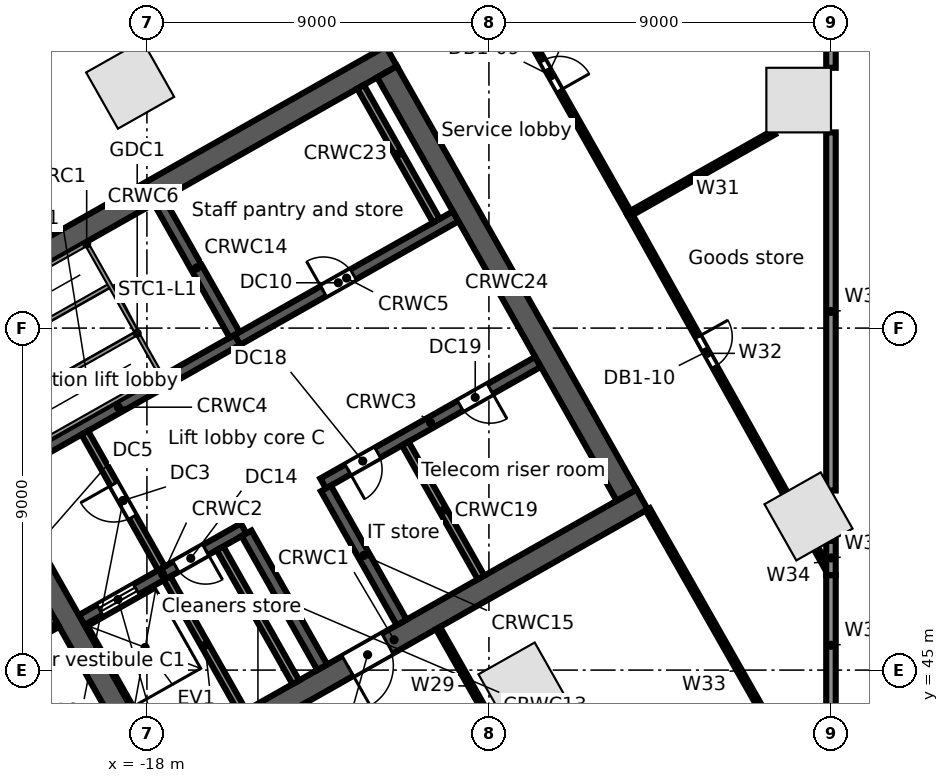
"""IFC4 building model, lengths in metres.
Left out: names, types, materials, properties, quantities, classifications, styles, units other than length and angle.
Written with IfcOpenShell. Run it as: python <this file> out.ifc"""

import sys

from ifc_helpers import new_model, si_unit, direction, frame, frame_2d, origin, origin_2d, place, context, subcontext, project, spatial, rectangle, extrude, element, fill, save


model = new_model("IFC4")
c1 = context("Model", 3, precision=1e-05, world=origin(), true_north=direction((0.0, 1.0)))
c2 = subcontext(c1, "Body", "Model", "MODEL_VIEW")
j1 = project(units=[si_unit("LENGTHUNIT", "METRE"), si_unit("PLANEANGLEUNIT", "RADIAN")], contexts=[c1])
p1 = place(None, origin())
s1 = spatial("IfcSite", under=j1, at=p1, CompositionType="ELEMENT")
p2 = place(p1, origin())
s2 = spatial("IfcBuilding", under=s1, at=p2, CompositionType="ELEMENT")
p3 = place(p2, frame((0.0, 0.0, -4.8)))
s3 = spatial("IfcBuildingStorey", under=s2, at=p3, CompositionType="ELEMENT", Elevation=-4.8)
p4 = place(p3, frame((-5.971, 78.503, 0.0), z_axis=(0.0, 0.0, 1.0), x_axis=(-0.870356741611, -0.492421711882, 0.0)))
e1 = element("IfcWall", 1, at=p4, inside=s3, PredefinedType="SOLIDWALL", context=c2, shape_type="SweptSolid", body=[
    extrude(rectangle(XDim=70.604, YDim=0.8, at=frame_2d((35.302, 0.0))), origin(), (0.0, 0.0, 1.0), 4.8),
])
for number, where, z_axis, x_axis in (
    (2, (-18.441, 60.406, 0.0), (0.0, 0.0, 1.0), (-0.87, -0.492, 0.0)),
    (3, (-8.117, 44.568, 0.0), (0.0, 0.0, 1.0), (0.87, 0.492, 0.0)),
    (4, (-0.591, 49.044, 0.0), (0.0, 0.0, 1.0), (0.87, 0.492, 0.0)),
    (5, (-0.85, 60.0, 0.0), (0.0, 0.0, 1.0), (0.0, 1.0, 0.0)),
):
    element("IfcColumn", number, at=place(p3, frame(where, z_axis=z_axis, x_axis=x_axis)), inside=s3, PredefinedType="COLUMN", context=c2, shape_type="SweptSolid", body=[
        extrude(rectangle(XDim=1.7, YDim=1.7, at=origin_2d()), origin(), (0.0, 0.0, 1.0), 4.8),
    ])
p5 = place(p3, frame((-18.024, 42.104, 0.0), z_axis=(0.0, 0.0, 1.0), x_axis=(0.870360574057, 0.492414937962, 0.0)))
e6 = element("IfcWall", 6, at=p5, inside=s3, PredefinedType="SOLIDWALL", context=c2, shape_type="SweptSolid", body=[
    extrude(rectangle(XDim=15.0, YDim=0.6, at=frame_2d((7.5, 0.0))), origin(), (0.0, 0.0, 1.0), 4.35),
])
p6 = place(p5, frame((6.1, 0.0, 0.0)))
e7 = element("IfcOpeningElement", 7, at=p6, cuts=e6, PredefinedType="OPENING", context=c2, shape_type="SweptSolid", body=[
    extrude(rectangle(XDim=1.2, YDim=2.1, at=frame_2d((0.6, 1.05))), frame((0.0, 0.31, 0.0), z_axis=(0.0, -1.0, 0.0), x_axis=(1.0, 0.0, 0.0)), (0.0, 0.0, 1.0), 0.62),
])
p7 = place(p3, frame((-19.718, 46.316, 0.0), z_axis=(0.0, 0.0, 1.0), x_axis=(0.870353963862, 0.492426621528, 0.0)))
e8 = element("IfcWall", 8, at=p7, inside=s3, PredefinedType="SOLIDWALL", context=c2, shape_type="SweptSolid", body=[
    extrude(rectangle(XDim=4.9, YDim=0.3, at=frame_2d((2.45, 0.0))), origin(), (0.0, 0.0, 1.0), 4.35),
])
p8 = place(p7, frame((0.55, 0.0, 0.0)))
e9 = element("IfcOpeningElement", 9, at=p8, cuts=e8, PredefinedType="OPENING", context=c2, shape_type="SweptSolid", body=[
    extrude(rectangle(XDim=1.1, YDim=2.1, at=frame_2d((0.55, 1.05))), frame((0.0, 0.16, 0.0), z_axis=(0.0, -1.0, 0.0), x_axis=(1.0, 0.0, 0.0)), (0.0, 0.0, 1.0), 0.32),
])
p9 = place(p7, frame((2.85, 0.0, 0.0)))
e10 = element("IfcOpeningElement", 10, at=p9, cuts=e8, PredefinedType="OPENING", context=c2, shape_type="SweptSolid", body=[
    extrude(rectangle(XDim=0.9, YDim=2.1, at=frame_2d((0.45, 1.05))), frame((0.0, 0.16, 0.0), z_axis=(0.0, -1.0, 0.0), x_axis=(1.0, 0.0, 0.0)), (0.0, 0.0, 1.0), 0.32),
])
p10 = place(p3, frame((-13.365, 49.911, 0.0), z_axis=(0.0, 0.0, 1.0), x_axis=(0.870340995471, 0.49244954219, 0.0)))
e11 = element("IfcWall", 11, at=p10, inside=s3, PredefinedType="SOLIDWALL", context=c2, shape_type="SweptSolid", body=[
    extrude(rectangle(XDim=6.5, YDim=0.3, at=frame_2d((3.25, 0.0))), origin(), (0.0, 0.0, 1.0), 4.35),
])
p11 = place(p10, frame((0.75, 0.0, 0.0)))
e12 = element("IfcOpeningElement", 12, at=p11, cuts=e11, PredefinedType="OPENING", context=c2, shape_type="SweptSolid", body=[
    extrude(rectangle(XDim=0.9, YDim=2.1, at=frame_2d((0.45, 1.05))), frame((0.0, 0.16, 0.0), z_axis=(0.0, -1.0, 0.0), x_axis=(1.0, 0.0, 0.0)), (0.0, 0.0, 1.0), 0.32),
])
p12 = place(p10, frame((4.15, 0.0, 0.0)))
e13 = element("IfcOpeningElement", 13, at=p12, cuts=e11, PredefinedType="OPENING", context=c2, shape_type="SweptSolid", body=[
    extrude(rectangle(XDim=0.9, YDim=2.1, at=frame_2d((0.45, 1.05))), frame((0.0, 0.16, 0.0), z_axis=(0.0, -1.0, 0.0), x_axis=(1.0, 0.0, 0.0)), (0.0, 0.0, 1.0), 0.32),
])
p13 = place(p3, frame((-21.885, 50.146, 0.0), z_axis=(0.0, 0.0, 1.0), x_axis=(0.870359411463, 0.492416992881, 0.0)))
e14 = element("IfcWall", 14, at=p13, inside=s3, PredefinedType="SOLIDWALL", context=c2, shape_type="SweptSolid", body=[
    extrude(rectangle(XDim=7.2, YDim=0.3, at=frame_2d((3.6, 0.0))), origin(), (0.0, 0.0, 1.0), 4.35),
])
p14 = place(p13, frame((0.2, 0.0, 0.0)))
e15 = element("IfcOpeningElement", 15, at=p14, cuts=e14, PredefinedType="OPENING", context=c2, shape_type="SweptSolid", body=[
    extrude(rectangle(XDim=1.0, YDim=2.1, at=frame_2d((0.5, 1.05))), frame((0.0, 0.16, 0.0), z_axis=(0.0, -1.0, 0.0), x_axis=(1.0, 0.0, 0.0)), (0.0, 0.0, 1.0), 0.32),
])
p15 = place(p3, frame((-15.618, 53.691, 0.0), z_axis=(0.0, 0.0, 1.0), x_axis=(0.870356769198, 0.492421663121, 0.0)))
e16 = element("IfcWall", 16, at=p15, inside=s3, PredefinedType="SOLIDWALL", context=c2, shape_type="SweptSolid", body=[
    extrude(rectangle(XDim=6.6, YDim=0.3, at=frame_2d((3.3, 0.0))), origin(), (0.0, 0.0, 1.0), 4.35),
])
p16 = place(p15, frame((2.6, 0.0, 0.0)))
e17 = element("IfcOpeningElement", 17, at=p16, cuts=e16, PredefinedType="OPENING", context=c2, shape_type="SweptSolid", body=[
    extrude(rectangle(XDim=0.9, YDim=2.1, at=frame_2d((0.45, 1.05))), frame((0.0, 0.16, 0.0), z_axis=(0.0, -1.0, 0.0), x_axis=(1.0, 0.0, 0.0)), (0.0, 0.0, 1.0), 0.32),
])
p17 = place(p3, frame((-24.623, 53.767, 0.0), z_axis=(0.0, 0.0, 1.0), x_axis=(0.870356627484, 0.492421913601, 0.0)))
e18 = element("IfcWall", 18, at=p17, inside=s3, PredefinedType="SOLIDWALL", context=c2, shape_type="SweptSolid", body=[
    extrude(rectangle(XDim=15.0, YDim=0.6, at=frame_2d((7.5, 0.0))), origin(), (0.0, 0.0, 1.0), 4.35),
])
p18 = place(p3, frame((-24.214, 53.654, 0.0), z_axis=(0.0, 0.0, 1.0), x_axis=(0.492441221355, -0.870345703448, 0.0)))
e19 = element("IfcWall", 19, at=p18, inside=s3, PredefinedType="SOLIDWALL", context=c2, shape_type="SweptSolid", body=[
    extrude(rectangle(XDim=12.8, YDim=0.6, at=frame_2d((6.4, 0.0))), origin(), (0.0, 0.0, 1.0), 4.35),
])
p19 = place(p18, frame((5.8, 0.0, 0.0)))
e20 = element("IfcOpeningElement", 20, at=p19, cuts=e19, PredefinedType="OPENING", context=c2, shape_type="SweptSolid", body=[
    extrude(rectangle(XDim=1.2, YDim=2.1, at=frame_2d((0.6, 1.05))), frame((0.0, 0.31, 0.0), z_axis=(0.0, -1.0, 0.0), x_axis=(1.0, 0.0, 0.0)), (0.0, 0.0, 1.0), 0.62),
])
p20 = place(p3, frame((-17.469, 47.417, 0.0), z_axis=(0.0, 0.0, 1.0), x_axis=(0.492440575896, -0.870346068648, 0.0)))
e21 = element("IfcWall", 21, at=p20, inside=s3, PredefinedType="SOLIDWALL", context=c2, shape_type="SweptSolid", body=[
    extrude(rectangle(XDim=4.05, YDim=0.2, at=frame_2d((2.025, 0.0))), origin(), (0.0, 0.0, 1.0), 4.35),
])
p21 = place(p3, frame((-19.635, 51.246, 0.0), z_axis=(0.0, 0.0, 1.0), x_axis=(0.492408451753, -0.87036424366, 0.0)))
e22 = element("IfcWall", 22, at=p21, inside=s3, PredefinedType="PARTITIONING", context=c2, shape_type="SweptSolid", body=[
    extrude(rectangle(XDim=4.1, YDim=0.2, at=frame_2d((2.05, 0.0))), origin(), (0.0, 0.0, 1.0), 4.35),
])
p22 = place(p21, frame((1.55, 0.0, 0.0)))
e23 = element("IfcOpeningElement", 23, at=p22, cuts=e22, PredefinedType="OPENING", context=c2, shape_type="SweptSolid", body=[
    extrude(rectangle(XDim=1.0, YDim=2.1, at=frame_2d((0.5, 1.05))), frame((0.0, 0.11, 0.0), z_axis=(0.0, -1.0, 0.0), x_axis=(1.0, 0.0, 0.0)), (0.0, 0.0, 1.0), 0.22),
])
p23 = place(p3, frame((-16.076, 48.205, 0.0), z_axis=(0.0, 0.0, 1.0), x_axis=(0.492394910396, -0.870371904542, 0.0)))
e24 = element("IfcWall", 24, at=p23, inside=s3, PredefinedType="SOLIDWALL", context=c2, shape_type="SweptSolid", body=[
    extrude(rectangle(XDim=4.05, YDim=0.2, at=frame_2d((2.025, 0.0))), origin(), (0.0, 0.0, 1.0), 4.35),
])
p24 = place(p3, frame((-15.379, 48.599, 0.0), z_axis=(0.0, 0.0, 1.0), x_axis=(0.492394910396, -0.870371904542, 0.0)))
e25 = element("IfcWall", 25, at=p24, inside=s3, PredefinedType="SOLIDWALL", context=c2, shape_type="SweptSolid", body=[
    extrude(rectangle(XDim=4.05, YDim=0.3, at=frame_2d((2.025, 0.0))), origin(), (0.0, 0.0, 1.0), 4.35),
])
p25 = place(p3, frame((-17.686, 57.347, 0.0), z_axis=(0.0, 0.0, 1.0), x_axis=(0.492420746998, -0.870357287513, 0.0)))
e26 = element("IfcWall", 26, at=p25, inside=s3, PredefinedType="SOLIDWALL", context=c2, shape_type="SweptSolid", body=[
    extrude(rectangle(XDim=4.05, YDim=0.3, at=frame_2d((2.025, 0.0))), origin(), (0.0, 0.0, 1.0), 4.35),
])
p26 = place(p3, frame((-13.291, 49.781, 0.0), z_axis=(0.0, 0.0, 1.0), x_axis=(0.492394910396, -0.870371904542, 0.0)))
e27 = element("IfcWall", 27, at=p26, inside=s3, PredefinedType="SOLIDWALL", context=c2, shape_type="SweptSolid", body=[
    extrude(rectangle(XDim=4.05, YDim=0.3, at=frame_2d((2.025, 0.0))), origin(), (0.0, 0.0, 1.0), 4.35),
])
p27 = place(p3, frame((-11.202, 50.962, 0.0), z_axis=(0.0, 0.0, 1.0), x_axis=(0.49241474071, -0.870360685654, 0.0)))
e28 = element("IfcWall", 28, at=p27, inside=s3, PredefinedType="PARTITIONING", context=c2, shape_type="SweptSolid", body=[
    extrude(rectangle(XDim=4.05, YDim=0.2, at=frame_2d((2.025, 0.0))), origin(), (0.0, 0.0, 1.0), 4.35),
])
p28 = place(p3, frame((-12.377, 60.351, 0.0), z_axis=(0.0, 0.0, 1.0), x_axis=(0.492440575896, -0.870346068648, 0.0)))
e29 = element("IfcWall", 29, at=p28, inside=s3, PredefinedType="SOLIDWALL", context=c2, shape_type="SweptSolid", body=[
    extrude(rectangle(XDim=4.05, YDim=0.2, at=frame_2d((2.025, 0.0))), origin(), (0.0, 0.0, 1.0), 4.35),
])
p29 = place(p3, frame((-11.681, 60.744, 0.0), z_axis=(0.0, 0.0, 1.0), x_axis=(0.492426772896, -0.870353878221, 0.0)))
e30 = element("IfcWall", 30, at=p29, inside=s3, PredefinedType="SOLIDWALL", context=c2, shape_type="SweptSolid", body=[
    extrude(rectangle(XDim=12.8, YDim=0.6, at=frame_2d((6.4, 0.0))), origin(), (0.0, 0.0, 1.0), 4.35),
])
p30 = place(p3, frame((-23.464, 44.427, 0.0), z_axis=(0.0, 0.0, 1.0), x_axis=(0.870352535776, 0.492429145632, 0.0)))
e31 = element("IfcWall", 31, at=p30, inside=s3, PredefinedType="PARTITIONING", context=c2, shape_type="SweptSolid", body=[
    extrude(rectangle(XDim=3.591, YDim=0.125, at=frame_2d((1.795, 0.0))), origin(), (0.0, 0.0, 1.0), 4.35),
])
p31 = place(p3, frame((-13.822, 44.137, 0.0), z_axis=(0.0, 0.0, 1.0), x_axis=(0.492604200384, -0.870253469837, 0.0)))
e32 = element("IfcWall", 32, at=p31, inside=s3, PredefinedType="PARTITIONING", context=c2, shape_type="SweptSolid", body=[
    extrude(rectangle(XDim=3.5, YDim=0.125, at=frame_2d((1.75, 0.0))), origin(), (0.0, 0.0, 1.0), 3.63),
])
p32 = place(p3, frame((-10.34, 46.107, 0.0), z_axis=(0.0, 0.0, 1.0), x_axis=(0.492392845909, -0.87037307248, 0.0)))
e33 = element("IfcWall", 33, at=p32, inside=s3, PredefinedType="PARTITIONING", context=c2, shape_type="SweptSolid", body=[
    extrude(rectangle(XDim=3.5, YDim=0.125, at=frame_2d((1.75, 0.0))), origin(), (0.0, 0.0, 1.0), 3.63),
])
p33 = place(p3, frame((-9.532, 64.47, 0.0), z_axis=(0.0, 0.0, 1.0), x_axis=(0.492882680299, -0.870095778326, 0.0)))
e34 = element("IfcWall", 34, at=p33, inside=s3, PredefinedType="PARTITIONING", context=c2, shape_type="SweptSolid", body=[
    extrude(rectangle(XDim=8.584, YDim=0.125, at=frame_2d((4.292, 0.0))), origin(), (0.0, 0.0, 1.0), 3.412),
])
p34 = place(p33, frame((3.95, 0.0, 0.0)))
e35 = element("IfcOpeningElement", 35, at=p34, cuts=e34, PredefinedType="OPENING", context=c2, shape_type="SweptSolid", body=[
    extrude(rectangle(XDim=0.9, YDim=2.1, at=frame_2d((0.45, 1.05))), frame((0.0, 0.073, 0.0), z_axis=(0.0, -1.0, 0.0), x_axis=(1.0, 0.0, 0.0)), (0.0, 0.0, 1.0), 0.145),
])
p35 = place(p3, frame((-5.301, 57.001, 0.0), z_axis=(0.0, 0.0, 1.0), x_axis=(0.870403402545, 0.492339229433, 0.0)))
e36 = element("IfcWall", 36, at=p35, inside=s3, PredefinedType="PARTITIONING", context=c2, shape_type="SweptSolid", body=[
    extrude(rectangle(XDim=4.365, YDim=0.125, at=frame_2d((2.182, 0.0))), origin(), (0.0, 0.0, 1.0), 3.412),
])
p36 = place(p3, frame((-5.301, 57.001, 0.0), z_axis=(0.0, 0.0, 1.0), x_axis=(0.487215056149, -0.873282021492, 0.0)))
e37 = element("IfcWall", 37, at=p36, inside=s3, PredefinedType="PARTITIONING", context=c2, shape_type="SweptSolid", body=[
    extrude(rectangle(XDim=8.395, YDim=0.125, at=frame_2d((4.197, 0.0))), origin(), (0.0, 0.0, 1.0), 4.35),
])
p37 = place(p36, frame((3.7, 0.0, 0.0)))
e38 = element("IfcOpeningElement", 38, at=p37, cuts=e37, PredefinedType="OPENING", context=c2, shape_type="SweptSolid", body=[
    extrude(rectangle(XDim=0.9, YDim=2.1, at=frame_2d((0.45, 1.05))), frame((0.0, 0.073, 0.0), z_axis=(0.0, -1.0, 0.0), x_axis=(1.0, 0.0, 0.0)), (0.0, 0.0, 1.0), 0.145),
])
p38 = place(p3, frame((-4.821, 49.23, 0.0), z_axis=(0.0, 0.0, 1.0), x_axis=(0.494232133704, -0.869329970733, 0.0)))
e39 = element("IfcWall", 39, at=p38, inside=s3, PredefinedType="PARTITIONING", context=c2, shape_type="SweptSolid", body=[
    extrude(rectangle(XDim=9.755, YDim=0.125, at=frame_2d((4.877, 0.0))), origin(), (0.0, 0.0, 1.0), 3.63),
])
p39 = place(p3, frame((-0.383, 48.186, 0.0), z_axis=(0.0, 0.0, 1.0), x_axis=(0.487514911941, -0.873114660646, 0.0)))
e40 = element("IfcWall", 40, at=p39, inside=s3, PredefinedType="PARTITIONING", context=c2, shape_type="SweptSolid", body=[
    extrude(rectangle(XDim=0.786, YDim=0.125, at=frame_2d((0.393, 0.0))), origin(), (0.0, 0.0, 1.0), 3.412),
])
p40 = place(p3, frame((0.0, 43.806, 0.0), z_axis=(0.0, 0.0, 1.0), x_axis=(0.0, 1.0, 0.0)))
e41 = element("IfcWall", 41, at=p40, inside=s3, PredefinedType="PARTITIONING", context=c2, shape_type="SweptSolid", body=[
    extrude(rectangle(XDim=3.694, YDim=0.25, at=frame_2d((1.847, 0.0))), origin(), (0.0, 0.0, 1.0), 3.412),
])
p41 = place(p3, frame((0.0, 47.5, 0.0), z_axis=(0.0, 0.0, 1.0), x_axis=(0.0, 1.0, 0.0)))
e42 = element("IfcWall", 42, at=p41, inside=s3, PredefinedType="PARTITIONING", context=c2, shape_type="SweptSolid", body=[
    extrude(rectangle(XDim=0.902, YDim=0.25, at=frame_2d((0.451, 0.0))), origin(), (0.0, 0.0, 1.0), 4.35),
])
p42 = place(p3, frame((0.0, 49.726, 0.0), z_axis=(0.0, 0.0, 1.0), x_axis=(0.0, 1.0, 0.0)))
e43 = element("IfcWall", 43, at=p42, inside=s3, PredefinedType="PARTITIONING", context=c2, shape_type="SweptSolid", body=[
    extrude(rectangle(XDim=9.424, YDim=0.25, at=frame_2d((4.712, 0.0))), origin(), (0.0, 0.0, 1.0), 4.35),
])
p43 = place(p3, frame((0.0, 60.85, 0.0), z_axis=(0.0, 0.0, 1.0), x_axis=(0.0, 1.0, 0.0)))
e44 = element("IfcWall", 44, at=p43, inside=s3, PredefinedType="PARTITIONING", context=c2, shape_type="SweptSolid", body=[
    extrude(rectangle(XDim=7.723, YDim=0.25, at=frame_2d((3.861, 0.0))), origin(), (0.0, 0.0, 1.0), 3.63),
])
p44 = place(p8, origin())
e45 = element("IfcDoor", 45, at=p44, inside=s3, OperationType="DOUBLE_DOOR_SLIDING", PredefinedType="DOOR", context=c2, shape_type="SweptSolid", body=[
    extrude(rectangle(XDim=1.1, YDim=2.1, at=frame_2d((0.55, 1.05))), frame((0.0, 0.025, 0.0), z_axis=(0.0, -1.0, 0.0), x_axis=(1.0, 0.0, 0.0)), (0.0, 0.0, 1.0), 0.05),
])
fill(e9, e45)
p45 = place(p22, frame((1.0, 0.0, 0.0), z_axis=(0.0, 0.0, 1.0), x_axis=(-1.0, 0.0, 0.0)))
e46 = element("IfcDoor", 46, at=p45, inside=s3, OperationType="SINGLE_SWING_RIGHT", PredefinedType="DOOR", context=c2, shape_type="SweptSolid", body=[
    extrude(rectangle(XDim=1.0, YDim=2.1, at=frame_2d((0.5, 1.05))), frame((0.0, 0.025, 0.0), z_axis=(0.0, -1.0, 0.0), x_axis=(1.0, 0.0, 0.0)), (0.0, 0.0, 1.0), 0.05),
])
fill(e23, e46)
p46 = place(p6, frame((1.2, 0.0, 0.0), z_axis=(0.0, 0.0, 1.0), x_axis=(-1.0, 0.0, 0.0)))
e47 = element("IfcDoor", 47, at=p46, inside=s3, OperationType="SINGLE_SWING_RIGHT", PredefinedType="DOOR", context=c2, shape_type="SweptSolid", body=[
    extrude(rectangle(XDim=1.2, YDim=2.1, at=frame_2d((0.6, 1.05))), frame((0.0, 0.025, 0.0), z_axis=(0.0, -1.0, 0.0), x_axis=(1.0, 0.0, 0.0)), (0.0, 0.0, 1.0), 0.05),
])
fill(e7, e47)
p47 = place(p16, origin())
e48 = element("IfcDoor", 48, at=p47, inside=s3, OperationType="SINGLE_SWING_LEFT", PredefinedType="DOOR", context=c2, shape_type="SweptSolid", body=[
    extrude(rectangle(XDim=0.9, YDim=2.1, at=frame_2d((0.45, 1.05))), frame((0.0, 0.025, 0.0), z_axis=(0.0, -1.0, 0.0), x_axis=(1.0, 0.0, 0.0)), (0.0, 0.0, 1.0), 0.05),
])
fill(e17, e48)
p48 = place(p9, frame((0.9, 0.0, 0.0), z_axis=(0.0, 0.0, 1.0), x_axis=(-1.0, 0.0, 0.0)))
e49 = element("IfcDoor", 49, at=p48, inside=s3, OperationType="SINGLE_SWING_LEFT", PredefinedType="DOOR", context=c2, shape_type="SweptSolid", body=[
    extrude(rectangle(XDim=0.9, YDim=2.1, at=frame_2d((0.45, 1.05))), frame((0.0, 0.025, 0.0), z_axis=(0.0, -1.0, 0.0), x_axis=(1.0, 0.0, 0.0)), (0.0, 0.0, 1.0), 0.05),
])
fill(e10, e49)
p49 = place(p11, frame((0.9, 0.0, 0.0), z_axis=(0.0, 0.0, 1.0), x_axis=(-1.0, 0.0, 0.0)))
e50 = element("IfcDoor", 50, at=p49, inside=s3, OperationType="SINGLE_SWING_RIGHT", PredefinedType="DOOR", context=c2, shape_type="SweptSolid", body=[
    extrude(rectangle(XDim=0.9, YDim=2.1, at=frame_2d((0.45, 1.05))), frame((0.0, 0.025, 0.0), z_axis=(0.0, -1.0, 0.0), x_axis=(1.0, 0.0, 0.0)), (0.0, 0.0, 1.0), 0.05),
])
fill(e12, e50)
p50 = place(p12, frame((0.9, 0.0, 0.0), z_axis=(0.0, 0.0, 1.0), x_axis=(-1.0, 0.0, 0.0)))
e51 = element("IfcDoor", 51, at=p50, inside=s3, OperationType="SINGLE_SWING_LEFT", PredefinedType="DOOR", context=c2, shape_type="SweptSolid", body=[
    extrude(rectangle(XDim=0.9, YDim=2.1, at=frame_2d((0.45, 1.05))), frame((0.0, 0.025, 0.0), z_axis=(0.0, -1.0, 0.0), x_axis=(1.0, 0.0, 0.0)), (0.0, 0.0, 1.0), 0.05),
])
fill(e13, e51)
p51 = place(p34, origin())
e52 = element("IfcDoor", 52, at=p51, inside=s3, OperationType="SINGLE_SWING_RIGHT", PredefinedType="DOOR", context=c2, shape_type="SweptSolid", body=[
    extrude(rectangle(XDim=0.9, YDim=2.1, at=frame_2d((0.45, 1.05))), frame((0.0, 0.025, 0.0), z_axis=(0.0, -1.0, 0.0), x_axis=(1.0, 0.0, 0.0)), (0.0, 0.0, 1.0), 0.05),
])
fill(e35, e52)
p52 = place(p37, origin())
e53 = element("IfcDoor", 53, at=p52, inside=s3, OperationType="SINGLE_SWING_LEFT", PredefinedType="DOOR", context=c2, shape_type="SweptSolid", body=[
    extrude(rectangle(XDim=0.9, YDim=2.1, at=frame_2d((0.45, 1.05))), frame((0.0, 0.025, 0.0), z_axis=(0.0, -1.0, 0.0), x_axis=(1.0, 0.0, 0.0)), (0.0, 0.0, 1.0), 0.05),
])
fill(e38, e53)
save(model, sys.argv[1])
